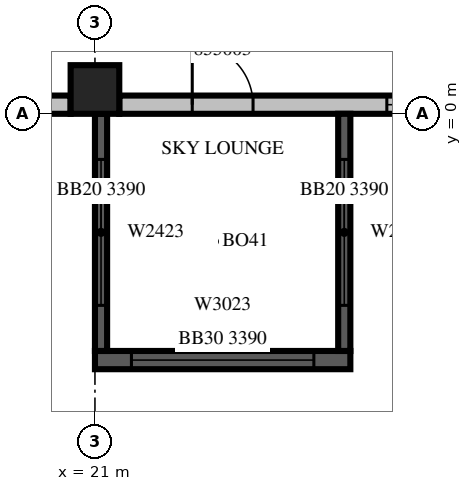
"""IFC4 building model, lengths in metres.
Left out: names, types, materials, properties, quantities, classifications, styles, units other than length and angle.
Written with IfcOpenShell. Run it as: python <this file> out.ifc"""

import sys

from ifc_helpers import new_model, si_unit, direction, frame, frame_2d, origin, origin_2d, place, context, subcontext, project, spatial, rectangle, extrude, source, transform, mapped, element, fill, save


model = new_model("IFC4")
c1 = context("Model", 3, precision=1e-05, world=origin(), true_north=direction((0.0, 1.0)))
c2 = subcontext(c1, "Body", "Model", "MODEL_VIEW")
j1 = project(units=[si_unit("LENGTHUNIT", "METRE"), si_unit("PLANEANGLEUNIT", "RADIAN")], contexts=[c1])
p1 = place(None, origin())
s1 = spatial("IfcSite", under=j1, at=p1, CompositionType="ELEMENT")
p2 = place(p1, origin())
s2 = spatial("IfcBuilding", under=s1, at=p2, CompositionType="ELEMENT")
p3 = place(p2, frame((0.0, 0.0, 242.4)))
s3 = spatial("IfcBuildingStorey", under=s2, at=p3, CompositionType="ELEMENT", Elevation=242.4)
m1 = source(origin(), c2, "Body", "SweptSolid", [
    extrude(rectangle(XDim=0.8, YDim=0.8, at=origin_2d()), origin(), (0.0, 0.0, 1.0), 3.8),
])
p4 = place(p3, frame((21.0, 0.4, 0.0), z_axis=(0.0, 0.0, 1.0), x_axis=(1.0, 0.0, 0.0)))
e1 = element("IfcColumn", 1, at=p4, inside=s3, PredefinedType="COLUMN", context=c2, shape_type="MappedRepresentation", body=[
    mapped(m1, transform((0.0, 0.0, 0.0), scale=1.0)),
])
m2 = source(origin(), c2, "Body", "SweptSolid", [
    extrude(rectangle(XDim=9.7, YDim=0.3, at=frame_2d((4.85, 0.0))), origin(), (0.0, 0.0, 1.0), 3.4),
])
p5 = place(p3, frame((10.9, 0.15, 0.0), z_axis=(0.0, 0.0, 1.0), x_axis=(1.0, 0.0, 0.0)))
e2 = element("IfcWall", 2, at=p5, inside=s3, PredefinedType="STANDARD", context=c2, shape_type="MappedRepresentation", body=[
    mapped(m2, transform((0.0, 0.0, 0.0), scale=1.0)),
])
m3 = source(origin(), c2, "Body", "SweptSolid", [
    extrude(rectangle(XDim=3.6, YDim=2.3, at=frame_2d((1.8, 1.15))), frame((0.0, 0.16, 0.0), z_axis=(0.0, -1.0, 0.0), x_axis=(1.0, 0.0, 0.0)), (0.0, 0.0, 1.0), 0.32),
])
p6 = place(p5, frame((5.675, 0.0, 0.6)))
e3 = element("IfcOpeningElement", 3, at=p6, cuts=e2, PredefinedType="OPENING", context=c2, shape_type="MappedRepresentation", body=[
    mapped(m3, transform((0.0, 0.0, 0.0), scale=1.0)),
])
m4 = source(origin(), c2, "Body", "SweptSolid", [
    extrude(rectangle(XDim=1.0, YDim=2.1, at=frame_2d((0.5, 1.05))), frame((0.0, 0.16, 0.0), z_axis=(0.0, -1.0, 0.0), x_axis=(1.0, 0.0, 0.0)), (0.0, 0.0, 1.0), 0.32),
])
p7 = place(p5, frame((1.725, 0.0, 0.0)))
e4 = element("IfcOpeningElement", 4, at=p7, cuts=e2, PredefinedType="OPENING", context=c2, shape_type="MappedRepresentation", body=[
    mapped(m4, transform((0.0, 0.0, 0.0), scale=1.0)),
])
m5 = source(origin(), c2, "Body", "SweptSolid", [
    extrude(rectangle(XDim=7.6, YDim=0.3, at=frame_2d((3.8, 0.0))), origin(), (0.0, 0.0, 1.0), 3.4),
])
p8 = place(p3, frame((21.4, 0.15, 0.0), z_axis=(0.0, 0.0, 1.0), x_axis=(1.0, 0.0, 0.0)))
e5 = element("IfcWall", 5, at=p8, inside=s3, PredefinedType="STANDARD", context=c2, shape_type="MappedRepresentation", body=[
    mapped(m5, transform((0.0, 0.0, 0.0), scale=1.0)),
])
m6 = source(origin(), c2, "Body", "SweptSolid", [
    extrude(rectangle(XDim=3.0, YDim=2.3, at=frame_2d((1.5, 1.15))), frame((0.0, 0.16, 0.0), z_axis=(0.0, -1.0, 0.0), x_axis=(1.0, 0.0, 0.0)), (0.0, 0.0, 1.0), 0.32),
])
p9 = place(p8, frame((4.4, 0.0, 0.6)))
e6 = element("IfcOpeningElement", 6, at=p9, cuts=e5, PredefinedType="OPENING", context=c2, shape_type="MappedRepresentation", body=[
    mapped(m6, transform((0.0, 0.0, 0.0), scale=1.0)),
])
p10 = place(p8, frame((1.2, 0.0, 0.0)))
e7 = element("IfcOpeningElement", 7, at=p10, cuts=e5, PredefinedType="OPENING", context=c2, shape_type="MappedRepresentation", body=[
    mapped(m4, transform((0.0, 0.0, 0.0), scale=1.0)),
])
m7 = source(origin(), c2, "Body", "SweptSolid", [
    extrude(rectangle(XDim=4.2, YDim=0.3, at=frame_2d((2.1, 0.0))), origin(), (0.0, 0.0, 1.0), 3.39),
])
p11 = place(p3, frame((21.0, -4.05, 0.0), z_axis=(0.0, 0.0, 1.0), x_axis=(1.0, 0.0, 0.0)))
e8 = element("IfcWall", 8, at=p11, inside=s3, PredefinedType="SOLIDWALL", context=c2, shape_type="MappedRepresentation", body=[
    mapped(m7, transform((0.0, 0.0, 0.0), scale=1.0)),
])
p12 = place(p11, frame((0.6, 0.0, 0.6)))
e9 = element("IfcOpeningElement", 9, at=p12, cuts=e8, PredefinedType="OPENING", context=c2, shape_type="MappedRepresentation", body=[
    mapped(m6, transform((0.0, 0.0, 0.0), scale=1.0)),
])
m8 = source(origin(), c2, "Body", "SweptSolid", [
    extrude(rectangle(XDim=3.9, YDim=0.2, at=frame_2d((1.95, 0.0))), origin(), (0.0, 0.0, 1.0), 3.39),
])
p13 = place(p3, frame((21.1, 0.0, 0.0), z_axis=(0.0, 0.0, 1.0), x_axis=(0.0, -1.0, 0.0)))
e10 = element("IfcWall", 10, at=p13, inside=s3, PredefinedType="SOLIDWALL", context=c2, shape_type="MappedRepresentation", body=[
    mapped(m8, transform((0.0, 0.0, 0.0), scale=1.0)),
])
m9 = source(origin(), c2, "Body", "SweptSolid", [
    extrude(rectangle(XDim=2.4, YDim=2.3, at=frame_2d((1.2, 1.15))), frame((0.0, 0.11, 0.0), z_axis=(0.0, -1.0, 0.0), x_axis=(1.0, 0.0, 0.0)), (0.0, 0.0, 1.0), 0.22),
])
p14 = place(p13, frame((0.75, 0.0, 0.6)))
e11 = element("IfcOpeningElement", 11, at=p14, cuts=e10, PredefinedType="OPENING", context=c2, shape_type="MappedRepresentation", body=[
    mapped(m9, transform((0.0, 0.0, 0.0), scale=1.0)),
])
p15 = place(p3, frame((25.1, 0.0, 0.0), z_axis=(0.0, 0.0, 1.0), x_axis=(0.0, -1.0, 0.0)))
e12 = element("IfcWall", 12, at=p15, inside=s3, PredefinedType="SOLIDWALL", context=c2, shape_type="MappedRepresentation", body=[
    mapped(m8, transform((0.0, 0.0, 0.0), scale=1.0)),
])
p16 = place(p15, frame((0.75, 0.0, 0.6)))
e13 = element("IfcOpeningElement", 13, at=p16, cuts=e12, PredefinedType="OPENING", context=c2, shape_type="MappedRepresentation", body=[
    mapped(m9, transform((0.0, 0.0, 0.0), scale=1.0)),
])
m10 = source(origin(), c2, "Body", "SweptSolid", [
    extrude(rectangle(XDim=3.0, YDim=2.3, at=frame_2d((1.5, 1.15))), frame((0.0, 0.03, 0.0), z_axis=(0.0, -1.0, 0.0), x_axis=(1.0, 0.0, 0.0)), (0.0, 0.0, 1.0), 0.06),
])
p17 = place(p9, origin())
e14 = element("IfcWindow", 14, at=p17, inside=s3, PartitioningType="SINGLE_PANEL", PredefinedType="WINDOW", context=c2, shape_type="MappedRepresentation", body=[
    mapped(m10, transform((0.0, 0.0, 0.0), scale=1.0)),
])
fill(e6, e14)
p18 = place(p12, origin())
e15 = element("IfcWindow", 15, at=p18, inside=s3, PartitioningType="SINGLE_PANEL", PredefinedType="WINDOW", context=c2, shape_type="MappedRepresentation", body=[
    mapped(m10, transform((0.0, 0.0, 0.0), scale=1.0)),
])
fill(e9, e15)
m11 = source(origin(), c2, "Body", "SweptSolid", [
    extrude(rectangle(XDim=2.4, YDim=2.3, at=frame_2d((1.2, 1.15))), frame((0.0, 0.03, 0.0), z_axis=(0.0, -1.0, 0.0), x_axis=(1.0, 0.0, 0.0)), (0.0, 0.0, 1.0), 0.06),
])
p19 = place(p14, origin())
e16 = element("IfcWindow", 16, at=p19, inside=s3, PartitioningType="SINGLE_PANEL", PredefinedType="WINDOW", context=c2, shape_type="MappedRepresentation", body=[
    mapped(m11, transform((0.0, 0.0, 0.0), scale=1.0)),
])
fill(e11, e16)
p20 = place(p16, origin())
e17 = element("IfcWindow", 17, at=p20, inside=s3, PartitioningType="SINGLE_PANEL", PredefinedType="WINDOW", context=c2, shape_type="MappedRepresentation", body=[
    mapped(m11, transform((0.0, 0.0, 0.0), scale=1.0)),
])
fill(e13, e17)
m12 = source(origin(), c2, "Body", "SweptSolid", [
    extrude(rectangle(XDim=1.0, YDim=2.1, at=frame_2d((0.5, 1.05))), frame((0.0, 0.025, 0.0), z_axis=(0.0, -1.0, 0.0), x_axis=(1.0, 0.0, 0.0)), (0.0, 0.0, 1.0), 0.05),
])
p21 = place(p10, origin())
e18 = element("IfcDoor", 18, at=p21, inside=s3, OperationType="SINGLE_SWING_LEFT", PredefinedType="DOOR", context=c2, shape_type="MappedRepresentation", body=[
    mapped(m12, transform((0.0, 0.0, 0.0), scale=1.0)),
])
fill(e7, e18)
save(model, sys.argv[1])
